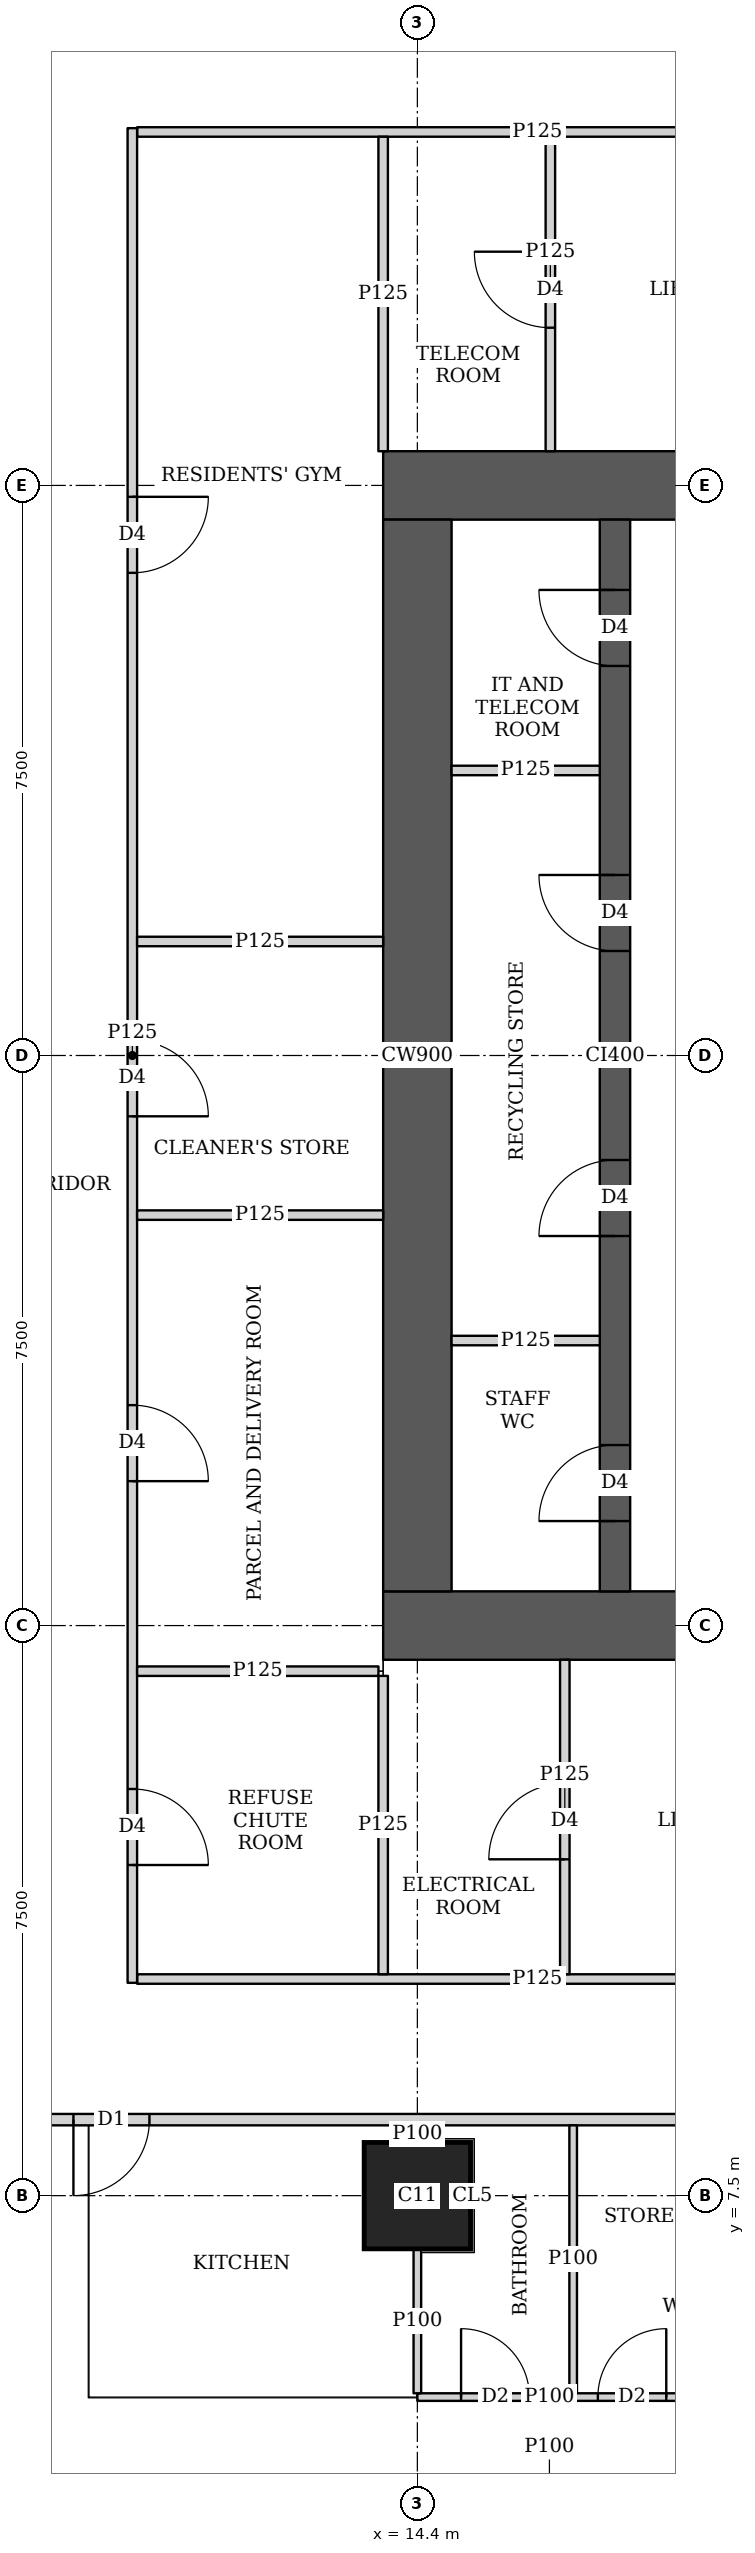
"""IFC4 building model, lengths in metres.
Left out: names, types, materials, properties, quantities, classifications, styles, units other than length and angle.
Written with IfcOpenShell. Run it as: python <this file> out.ifc"""

import sys

from ifc_helpers import new_model, si_unit, direction, frame, frame_2d, origin, origin_2d, place, context, subcontext, project, spatial, rectangle, extrude, element, fill, save


model = new_model("IFC4")
c1 = context("Model", 3, precision=1e-05, world=origin(), true_north=direction((0.0, 1.0)))
c2 = subcontext(c1, "Body", "Model", "MODEL_VIEW")
j1 = project(units=[si_unit("LENGTHUNIT", "METRE"), si_unit("PLANEANGLEUNIT", "RADIAN")], contexts=[c1])
p1 = place(None, origin())
s1 = spatial("IfcSite", under=j1, at=p1, CompositionType="ELEMENT")
p2 = place(p1, origin())
s2 = spatial("IfcBuilding", under=s1, at=p2, CompositionType="ELEMENT")
p3 = place(p2, frame((0.0, 0.0, 212.45)))
s3 = spatial("IfcBuildingStorey", under=s2, at=p3, CompositionType="ELEMENT", Elevation=212.45)
p4 = place(p3, frame((14.4, 7.5, 0.0), z_axis=(0.0, 0.0, 1.0), x_axis=(1.0, 0.0, 0.0)))
e1 = element("IfcColumn", 1, at=p4, inside=s3, PredefinedType="COLUMN", context=c2, shape_type="SweptSolid", body=[
    extrude(rectangle(XDim=1.4, YDim=1.4, at=origin_2d()), origin(), (0.0, 0.0, 1.0), 3.75),
])
p5 = place(p3, frame((13.95, 15.0, 0.0), z_axis=(0.0, 0.0, 1.0), x_axis=(1.0, 0.0, 0.0)))
e2 = element("IfcWall", 2, at=p5, inside=s3, PredefinedType="SHEAR", context=c2, shape_type="SweptSolid", body=[
    extrude(rectangle(XDim=15.3, YDim=0.9, at=frame_2d((7.65, 0.0))), origin(), (0.0, 0.0, 1.0), 3.75),
])
p6 = place(p5, frame((4.45, 0.0, 0.0)))
e3 = element("IfcOpeningElement", 3, at=p6, cuts=e2, PredefinedType="OPENING", context=c2, shape_type="SweptSolid", body=[
    extrude(rectangle(XDim=1.8, YDim=2.1, at=frame_2d((0.9, 1.05))), frame((0.0, 0.46, 0.0), z_axis=(0.0, -1.0, 0.0), x_axis=(1.0, 0.0, 0.0)), (0.0, 0.0, 1.0), 0.92),
])
p7 = place(p5, frame((10.7, 0.0, 0.0)))
e4 = element("IfcOpeningElement", 4, at=p7, cuts=e2, PredefinedType="OPENING", context=c2, shape_type="SweptSolid", body=[
    extrude(rectangle(XDim=1.1, YDim=2.1, at=frame_2d((0.55, 1.05))), frame((0.0, 0.46, 0.0), z_axis=(0.0, -1.0, 0.0), x_axis=(1.0, 0.0, 0.0)), (0.0, 0.0, 1.0), 0.92),
])
p8 = place(p3, frame((13.95, 30.0, 0.0), z_axis=(0.0, 0.0, 1.0), x_axis=(1.0, 0.0, 0.0)))
e5 = element("IfcWall", 5, at=p8, inside=s3, PredefinedType="SHEAR", context=c2, shape_type="SweptSolid", body=[
    extrude(rectangle(XDim=15.3, YDim=0.9, at=frame_2d((7.65, 0.0))), origin(), (0.0, 0.0, 1.0), 3.75),
])
p9 = place(p8, frame((4.45, 0.0, 0.0)))
e6 = element("IfcOpeningElement", 6, at=p9, cuts=e5, PredefinedType="OPENING", context=c2, shape_type="SweptSolid", body=[
    extrude(rectangle(XDim=1.8, YDim=2.1, at=frame_2d((0.9, 1.05))), frame((0.0, 0.46, 0.0), z_axis=(0.0, -1.0, 0.0), x_axis=(1.0, 0.0, 0.0)), (0.0, 0.0, 1.0), 0.92),
])
p10 = place(p8, frame((10.7, 0.0, 0.0)))
e7 = element("IfcOpeningElement", 7, at=p10, cuts=e5, PredefinedType="OPENING", context=c2, shape_type="SweptSolid", body=[
    extrude(rectangle(XDim=1.1, YDim=2.1, at=frame_2d((0.55, 1.05))), frame((0.0, 0.46, 0.0), z_axis=(0.0, -1.0, 0.0), x_axis=(1.0, 0.0, 0.0)), (0.0, 0.0, 1.0), 0.92),
])
p11 = place(p3, frame((14.4, 15.45, 0.0), z_axis=(0.0, 0.0, 1.0), x_axis=(0.0, 1.0, 0.0)))
e8 = element("IfcWall", 8, at=p11, inside=s3, PredefinedType="SHEAR", context=c2, shape_type="SweptSolid", body=[
    extrude(rectangle(XDim=14.1, YDim=0.9, at=frame_2d((7.05, 0.0))), origin(), (0.0, 0.0, 1.0), 3.75),
])
p12 = place(p3, frame((17.0, 15.45, 0.0), z_axis=(0.0, 0.0, 1.0), x_axis=(0.0, 1.0, 0.0)))
e9 = element("IfcWall", 9, at=p12, inside=s3, PredefinedType="SHEAR", context=c2, shape_type="SweptSolid", body=[
    extrude(rectangle(XDim=14.1, YDim=0.4, at=frame_2d((7.05, 0.0))), origin(), (0.0, 0.0, 1.0), 3.75),
])
p13 = place(p12, frame((0.925, 0.0, 0.0)))
e10 = element("IfcOpeningElement", 10, at=p13, cuts=e9, PredefinedType="OPENING", context=c2, shape_type="SweptSolid", body=[
    extrude(rectangle(XDim=1.0, YDim=2.1, at=frame_2d((0.5, 1.05))), frame((0.0, 0.21, 0.0), z_axis=(0.0, -1.0, 0.0), x_axis=(1.0, 0.0, 0.0)), (0.0, 0.0, 1.0), 0.42),
])
p14 = place(p12, frame((4.675, 0.0, 0.0)))
e11 = element("IfcOpeningElement", 11, at=p14, cuts=e9, PredefinedType="OPENING", context=c2, shape_type="SweptSolid", body=[
    extrude(rectangle(XDim=1.0, YDim=2.1, at=frame_2d((0.5, 1.05))), frame((0.0, 0.21, 0.0), z_axis=(0.0, -1.0, 0.0), x_axis=(1.0, 0.0, 0.0)), (0.0, 0.0, 1.0), 0.42),
])
p15 = place(p12, frame((8.425, 0.0, 0.0)))
e12 = element("IfcOpeningElement", 12, at=p15, cuts=e9, PredefinedType="OPENING", context=c2, shape_type="SweptSolid", body=[
    extrude(rectangle(XDim=1.0, YDim=2.1, at=frame_2d((0.5, 1.05))), frame((0.0, 0.21, 0.0), z_axis=(0.0, -1.0, 0.0), x_axis=(1.0, 0.0, 0.0)), (0.0, 0.0, 1.0), 0.42),
])
p16 = place(p12, frame((12.175, 0.0, 0.0)))
e13 = element("IfcOpeningElement", 13, at=p16, cuts=e9, PredefinedType="OPENING", context=c2, shape_type="SweptSolid", body=[
    extrude(rectangle(XDim=1.0, YDim=2.1, at=frame_2d((0.5, 1.05))), frame((0.0, 0.21, 0.0), z_axis=(0.0, -1.0, 0.0), x_axis=(1.0, 0.0, 0.0)), (0.0, 0.0, 1.0), 0.42),
])
p17 = place(p3, frame((40.053, 8.5, 0.0), z_axis=(0.0, 0.0, 1.0), x_axis=(-1.0, 0.0, 0.0)))
e14 = element("IfcWall", 14, at=p17, inside=s3, PredefinedType="SOLIDWALL", context=c2, shape_type="SweptSolid", body=[
    extrude(rectangle(XDim=31.052, YDim=0.15, at=frame_2d((15.526, 0.0))), origin(), (0.0, 0.0, 1.0), 3.5),
])
p18 = place(p17, frame((29.178, 0.0, 0.0)))
e15 = element("IfcOpeningElement", 15, at=p18, cuts=e14, PredefinedType="OPENING", context=c2, shape_type="SweptSolid", body=[
    extrude(rectangle(XDim=1.0, YDim=2.1, at=frame_2d((0.5, 1.05))), frame((0.0, 0.085, 0.0), z_axis=(0.0, -1.0, 0.0), x_axis=(1.0, 0.0, 0.0)), (0.0, 0.0, 1.0), 0.17),
])
p19 = place(p17, frame((19.953, 0.0, 0.0)))
e16 = element("IfcOpeningElement", 16, at=p19, cuts=e14, PredefinedType="OPENING", context=c2, shape_type="SweptSolid", body=[
    extrude(rectangle(XDim=1.0, YDim=2.1, at=frame_2d((0.5, 1.05))), frame((0.0, 0.085, 0.0), z_axis=(0.0, -1.0, 0.0), x_axis=(1.0, 0.0, 0.0)), (0.0, 0.0, 1.0), 0.17),
])
p20 = place(p17, frame((12.753, 0.0, 0.0)))
e17 = element("IfcOpeningElement", 17, at=p20, cuts=e14, PredefinedType="OPENING", context=c2, shape_type="SweptSolid", body=[
    extrude(rectangle(XDim=1.0, YDim=2.1, at=frame_2d((0.5, 1.05))), frame((0.0, 0.085, 0.0), z_axis=(0.0, -1.0, 0.0), x_axis=(1.0, 0.0, 0.0)), (0.0, 0.0, 1.0), 0.17),
])
p21 = place(p17, frame((0.15, 0.0, 0.0)))
e18 = element("IfcOpeningElement", 18, at=p21, cuts=e14, PredefinedType="OPENING", context=c2, shape_type="SweptSolid", body=[
    extrude(rectangle(XDim=1.0, YDim=2.1, at=frame_2d((0.5, 1.05))), frame((0.0, 0.085, 0.0), z_axis=(0.0, -1.0, 0.0), x_axis=(1.0, 0.0, 0.0)), (0.0, 0.0, 1.0), 0.17),
])
p22 = place(p3, frame((17.875, 4.85, 0.0), z_axis=(0.0, 0.0, 1.0), x_axis=(-1.0, 0.0, 0.0)))
e19 = element("IfcWall", 19, at=p22, inside=s3, PredefinedType="PARTITIONING", context=c2, shape_type="SweptSolid", body=[
    extrude(rectangle(XDim=3.475, YDim=0.1, at=frame_2d((1.738, 0.0))), origin(), (0.0, 0.0, 1.0), 3.5),
])
p23 = place(p22, frame((2.0, 0.0, 0.0)))
e20 = element("IfcOpeningElement", 20, at=p23, cuts=e19, PredefinedType="OPENING", context=c2, shape_type="SweptSolid", body=[
    extrude(rectangle(XDim=0.9, YDim=2.1, at=frame_2d((0.45, 1.05))), frame((0.0, 0.06, 0.0), z_axis=(0.0, -1.0, 0.0), x_axis=(1.0, 0.0, 0.0)), (0.0, 0.0, 1.0), 0.12),
])
p24 = place(p22, frame((0.2, 0.0, 0.0)))
e21 = element("IfcOpeningElement", 21, at=p24, cuts=e19, PredefinedType="OPENING", context=c2, shape_type="SweptSolid", body=[
    extrude(rectangle(XDim=0.9, YDim=2.1, at=frame_2d((0.45, 1.05))), frame((0.0, 0.06, 0.0), z_axis=(0.0, -1.0, 0.0), x_axis=(1.0, 0.0, 0.0)), (0.0, 0.0, 1.0), 0.12),
])
p25 = place(p3, frame((14.4, 4.9, 0.0), z_axis=(0.0, 0.0, 1.0), x_axis=(0.0, 1.0, 0.0)))
e22 = element("IfcWall", 22, at=p25, inside=s3, PredefinedType="PARTITIONING", context=c2, shape_type="SweptSolid", body=[
    extrude(rectangle(XDim=1.899, YDim=0.1, at=frame_2d((0.95, 0.0))), origin(), (0.0, 0.0, 1.0), 3.5),
])
p26 = place(p3, frame((14.4, 8.201, 0.0), z_axis=(0.0, 0.0, 1.0), x_axis=(0.0, 1.0, 0.0)))
e23 = element("IfcWall", 23, at=p26, inside=s3, PredefinedType="PARTITIONING", context=c2, shape_type="SweptSolid", body=[
    extrude(rectangle(XDim=0.224, YDim=0.1, at=frame_2d((0.112, 0.0))), origin(), (0.0, 0.0, 1.0), 3.5),
])
p27 = place(p3, frame((16.45, 4.9, 0.0), z_axis=(0.0, 0.0, 1.0), x_axis=(0.0, 1.0, 0.0)))
e24 = element("IfcWall", 24, at=p27, inside=s3, PredefinedType="PARTITIONING", context=c2, shape_type="SweptSolid", body=[
    extrude(rectangle(XDim=3.525, YDim=0.1, at=frame_2d((1.763, 0.0))), origin(), (0.0, 0.0, 1.0), 3.5),
])
p28 = place(p3, frame((10.65, 10.3, 0.0), z_axis=(0.0, 0.0, 1.0), x_axis=(0.0, 1.0, 0.0)))
e25 = element("IfcWall", 25, at=p28, inside=s3, PredefinedType="PARTITIONING", context=c2, shape_type="SweptSolid", body=[
    extrude(rectangle(XDim=24.4, YDim=0.125, at=frame_2d((12.2, 0.0))), origin(), (0.0, 0.0, 1.0), 3.5),
])
p29 = place(p28, frame((1.55, 0.0, 0.0)))
e26 = element("IfcOpeningElement", 26, at=p29, cuts=e25, PredefinedType="OPENING", context=c2, shape_type="SweptSolid", body=[
    extrude(rectangle(XDim=1.0, YDim=2.1, at=frame_2d((0.5, 1.05))), frame((0.0, 0.073, 0.0), z_axis=(0.0, -1.0, 0.0), x_axis=(1.0, 0.0, 0.0)), (0.0, 0.0, 1.0), 0.145),
])
p30 = place(p28, frame((6.6, 0.0, 0.0)))
e27 = element("IfcOpeningElement", 27, at=p30, cuts=e25, PredefinedType="OPENING", context=c2, shape_type="SweptSolid", body=[
    extrude(rectangle(XDim=1.0, YDim=2.1, at=frame_2d((0.5, 1.05))), frame((0.0, 0.073, 0.0), z_axis=(0.0, -1.0, 0.0), x_axis=(1.0, 0.0, 0.0)), (0.0, 0.0, 1.0), 0.145),
])
p31 = place(p28, frame((11.4, 0.0, 0.0)))
e28 = element("IfcOpeningElement", 28, at=p31, cuts=e25, PredefinedType="OPENING", context=c2, shape_type="SweptSolid", body=[
    extrude(rectangle(XDim=1.0, YDim=2.1, at=frame_2d((0.5, 1.05))), frame((0.0, 0.073, 0.0), z_axis=(0.0, -1.0, 0.0), x_axis=(1.0, 0.0, 0.0)), (0.0, 0.0, 1.0), 0.145),
])
p32 = place(p28, frame((18.55, 0.0, 0.0)))
e29 = element("IfcOpeningElement", 29, at=p32, cuts=e25, PredefinedType="OPENING", context=c2, shape_type="SweptSolid", body=[
    extrude(rectangle(XDim=1.0, YDim=2.1, at=frame_2d((0.5, 1.05))), frame((0.0, 0.073, 0.0), z_axis=(0.0, -1.0, 0.0), x_axis=(1.0, 0.0, 0.0)), (0.0, 0.0, 1.0), 0.145),
])
p33 = place(p3, frame((10.713, 14.4, 0.0), z_axis=(0.0, 0.0, 1.0), x_axis=(1.0, 0.0, 0.0)))
e30 = element("IfcWall", 30, at=p33, inside=s3, PredefinedType="PARTITIONING", context=c2, shape_type="SweptSolid", body=[
    extrude(rectangle(XDim=3.175, YDim=0.125, at=frame_2d((1.587, 0.0))), origin(), (0.0, 0.0, 1.0), 3.5),
])
for number, where, z_axis, x_axis in (
    (31, (10.713, 20.4, 0.0), (0.0, 0.0, 1.0), (1.0, 0.0, 0.0)),
    (32, (10.713, 24.0, 0.0), (0.0, 0.0, 1.0), (1.0, 0.0, 0.0)),
):
    element("IfcWall", number, at=place(p3, frame(where, z_axis=z_axis, x_axis=x_axis)), inside=s3, PredefinedType="PARTITIONING", context=c2, shape_type="SweptSolid", body=[
        extrude(rectangle(XDim=3.237, YDim=0.125, at=frame_2d((1.619, 0.0))), origin(), (0.0, 0.0, 1.0), 3.5),
    ])
p34 = place(p3, frame((13.95, 10.413, 0.0), z_axis=(0.0, 0.0, 1.0), x_axis=(0.0, 1.0, 0.0)))
e33 = element("IfcWall", 33, at=p34, inside=s3, PredefinedType="PARTITIONING", context=c2, shape_type="SweptSolid", body=[
    extrude(rectangle(XDim=3.925, YDim=0.125, at=frame_2d((1.962, 0.0))), origin(), (0.0, 0.0, 1.0), 3.5),
])
p35 = place(p3, frame((13.95, 30.45, 0.0), z_axis=(0.0, 0.0, 1.0), x_axis=(0.0, 1.0, 0.0)))
e34 = element("IfcWall", 34, at=p35, inside=s3, PredefinedType="PARTITIONING", context=c2, shape_type="SweptSolid", body=[
    extrude(rectangle(XDim=4.137, YDim=0.125, at=frame_2d((2.068, 0.0))), origin(), (0.0, 0.0, 1.0), 3.5),
])
p36 = place(p3, frame((10.713, 10.35, 0.0), z_axis=(0.0, 0.0, 1.0), x_axis=(1.0, 0.0, 0.0)))
e35 = element("IfcWall", 35, at=p36, inside=s3, PredefinedType="PARTITIONING", context=c2, shape_type="SweptSolid", body=[
    extrude(rectangle(XDim=10.537, YDim=0.125, at=frame_2d((5.269, 0.0))), origin(), (0.0, 0.0, 1.0), 3.5),
])
p37 = place(p36, frame((7.282, 0.0, 0.0)))
e36 = element("IfcOpeningElement", 36, at=p37, cuts=e35, PredefinedType="OPENING", context=c2, shape_type="SweptSolid", body=[
    extrude(rectangle(XDim=1.8, YDim=2.1, at=frame_2d((0.9, 1.05))), frame((0.0, 0.073, 0.0), z_axis=(0.0, -1.0, 0.0), x_axis=(1.0, 0.0, 0.0)), (0.0, 0.0, 1.0), 0.145),
])
p38 = place(p3, frame((10.713, 34.65, 0.0), z_axis=(0.0, 0.0, 1.0), x_axis=(1.0, 0.0, 0.0)))
e37 = element("IfcWall", 37, at=p38, inside=s3, PredefinedType="PARTITIONING", context=c2, shape_type="SweptSolid", body=[
    extrude(rectangle(XDim=10.537, YDim=0.125, at=frame_2d((5.269, 0.0))), origin(), (0.0, 0.0, 1.0), 3.5),
])
p39 = place(p38, frame((7.187, 0.0, 0.0)))
e38 = element("IfcOpeningElement", 38, at=p39, cuts=e37, PredefinedType="OPENING", context=c2, shape_type="SweptSolid", body=[
    extrude(rectangle(XDim=1.8, YDim=2.1, at=frame_2d((0.9, 1.05))), frame((0.0, 0.073, 0.0), z_axis=(0.0, -1.0, 0.0), x_axis=(1.0, 0.0, 0.0)), (0.0, 0.0, 1.0), 0.145),
])
p40 = place(p3, frame((16.34, 10.413, 0.0), z_axis=(0.0, 0.0, 1.0), x_axis=(0.0, 1.0, 0.0)))
e39 = element("IfcWall", 39, at=p40, inside=s3, PredefinedType="PARTITIONING", context=c2, shape_type="SweptSolid", body=[
    extrude(rectangle(XDim=4.137, YDim=0.125, at=frame_2d((2.068, 0.0))), origin(), (0.0, 0.0, 1.0), 3.5),
])
p41 = place(p40, frame((1.512, 0.0, 0.0)))
e40 = element("IfcOpeningElement", 40, at=p41, cuts=e39, PredefinedType="OPENING", context=c2, shape_type="SweptSolid", body=[
    extrude(rectangle(XDim=1.0, YDim=2.1, at=frame_2d((0.5, 1.05))), frame((0.0, 0.073, 0.0), z_axis=(0.0, -1.0, 0.0), x_axis=(1.0, 0.0, 0.0)), (0.0, 0.0, 1.0), 0.145),
])
p42 = place(p3, frame((16.15, 30.45, 0.0), z_axis=(0.0, 0.0, 1.0), x_axis=(0.0, 1.0, 0.0)))
e41 = element("IfcWall", 41, at=p42, inside=s3, PredefinedType="PARTITIONING", context=c2, shape_type="SweptSolid", body=[
    extrude(rectangle(XDim=4.137, YDim=0.125, at=frame_2d((2.068, 0.0))), origin(), (0.0, 0.0, 1.0), 3.5),
])
p43 = place(p42, frame((1.625, 0.0, 0.0)))
e42 = element("IfcOpeningElement", 42, at=p43, cuts=e41, PredefinedType="OPENING", context=c2, shape_type="SweptSolid", body=[
    extrude(rectangle(XDim=1.0, YDim=2.1, at=frame_2d((0.5, 1.05))), frame((0.0, 0.073, 0.0), z_axis=(0.0, -1.0, 0.0), x_axis=(1.0, 0.0, 0.0)), (0.0, 0.0, 1.0), 0.145),
])
for number, where, z_axis, x_axis in (
    (43, (14.85, 18.75, 0.0), (0.0, 0.0, 1.0), (1.0, 0.0, 0.0)),
    (44, (14.85, 26.25, 0.0), (0.0, 0.0, 1.0), (1.0, 0.0, 0.0)),
):
    element("IfcWall", number, at=place(p3, frame(where, z_axis=z_axis, x_axis=x_axis)), inside=s3, PredefinedType="PARTITIONING", context=c2, shape_type="SweptSolid", body=[
        extrude(rectangle(XDim=1.95, YDim=0.125, at=frame_2d((0.975, 0.0))), origin(), (0.0, 0.0, 1.0), 3.5),
    ])
p44 = place(p23, origin())
e45 = element("IfcDoor", 45, at=p44, inside=s3, OperationType="SINGLE_SWING_LEFT", PredefinedType="DOOR", context=c2, shape_type="SweptSolid", body=[
    extrude(rectangle(XDim=0.9, YDim=2.1, at=frame_2d((0.45, 1.05))), frame((0.0, 0.025, 0.0), z_axis=(0.0, -1.0, 0.0), x_axis=(1.0, 0.0, 0.0)), (0.0, 0.0, 1.0), 0.05),
])
fill(e20, e45)
p45 = place(p24, origin())
e46 = element("IfcDoor", 46, at=p45, inside=s3, OperationType="SINGLE_SWING_RIGHT", PredefinedType="DOOR", context=c2, shape_type="SweptSolid", body=[
    extrude(rectangle(XDim=0.9, YDim=2.1, at=frame_2d((0.45, 1.05))), frame((0.0, 0.025, 0.0), z_axis=(0.0, -1.0, 0.0), x_axis=(1.0, 0.0, 0.0)), (0.0, 0.0, 1.0), 0.05),
])
fill(e21, e46)
p46 = place(p18, origin())
e47 = element("IfcDoor", 47, at=p46, inside=s3, OperationType="SINGLE_SWING_RIGHT", PredefinedType="DOOR", context=c2, shape_type="SweptSolid", body=[
    extrude(rectangle(XDim=1.0, YDim=2.1, at=frame_2d((0.5, 1.05))), frame((0.0, 0.025, 0.0), z_axis=(0.0, -1.0, 0.0), x_axis=(1.0, 0.0, 0.0)), (0.0, 0.0, 1.0), 0.05),
])
fill(e15, e47)
p47 = place(p29, origin())
e48 = element("IfcDoor", 48, at=p47, inside=s3, OperationType="SINGLE_SWING_RIGHT", PredefinedType="DOOR", context=c2, shape_type="SweptSolid", body=[
    extrude(rectangle(XDim=1.0, YDim=2.1, at=frame_2d((0.5, 1.05))), frame((0.0, 0.025, 0.0), z_axis=(0.0, -1.0, 0.0), x_axis=(1.0, 0.0, 0.0)), (0.0, 0.0, 1.0), 0.05),
])
fill(e26, e48)
p48 = place(p30, origin())
e49 = element("IfcDoor", 49, at=p48, inside=s3, OperationType="SINGLE_SWING_RIGHT", PredefinedType="DOOR", context=c2, shape_type="SweptSolid", body=[
    extrude(rectangle(XDim=1.0, YDim=2.1, at=frame_2d((0.5, 1.05))), frame((0.0, 0.025, 0.0), z_axis=(0.0, -1.0, 0.0), x_axis=(1.0, 0.0, 0.0)), (0.0, 0.0, 1.0), 0.05),
])
fill(e27, e49)
p49 = place(p31, origin())
e50 = element("IfcDoor", 50, at=p49, inside=s3, OperationType="SINGLE_SWING_RIGHT", PredefinedType="DOOR", context=c2, shape_type="SweptSolid", body=[
    extrude(rectangle(XDim=1.0, YDim=2.1, at=frame_2d((0.5, 1.05))), frame((0.0, 0.025, 0.0), z_axis=(0.0, -1.0, 0.0), x_axis=(1.0, 0.0, 0.0)), (0.0, 0.0, 1.0), 0.05),
])
fill(e28, e50)
p50 = place(p32, origin())
e51 = element("IfcDoor", 51, at=p50, inside=s3, OperationType="SINGLE_SWING_LEFT", PredefinedType="DOOR", context=c2, shape_type="SweptSolid", body=[
    extrude(rectangle(XDim=1.0, YDim=2.1, at=frame_2d((0.5, 1.05))), frame((0.0, 0.025, 0.0), z_axis=(0.0, -1.0, 0.0), x_axis=(1.0, 0.0, 0.0)), (0.0, 0.0, 1.0), 0.05),
])
fill(e29, e51)
p51 = place(p41, origin())
e52 = element("IfcDoor", 52, at=p51, inside=s3, OperationType="SINGLE_SWING_LEFT", PredefinedType="DOOR", context=c2, shape_type="SweptSolid", body=[
    extrude(rectangle(XDim=1.0, YDim=2.1, at=frame_2d((0.5, 1.05))), frame((0.0, 0.025, 0.0), z_axis=(0.0, -1.0, 0.0), x_axis=(1.0, 0.0, 0.0)), (0.0, 0.0, 1.0), 0.05),
])
fill(e40, e52)
p52 = place(p43, origin())
e53 = element("IfcDoor", 53, at=p52, inside=s3, OperationType="SINGLE_SWING_RIGHT", PredefinedType="DOOR", context=c2, shape_type="SweptSolid", body=[
    extrude(rectangle(XDim=1.0, YDim=2.1, at=frame_2d((0.5, 1.05))), frame((0.0, 0.025, 0.0), z_axis=(0.0, -1.0, 0.0), x_axis=(1.0, 0.0, 0.0)), (0.0, 0.0, 1.0), 0.05),
])
fill(e42, e53)
p53 = place(p13, origin())
e54 = element("IfcDoor", 54, at=p53, inside=s3, OperationType="SINGLE_SWING_LEFT", PredefinedType="DOOR", context=c2, shape_type="SweptSolid", body=[
    extrude(rectangle(XDim=1.0, YDim=2.1, at=frame_2d((0.5, 1.05))), frame((0.0, 0.025, 0.0), z_axis=(0.0, -1.0, 0.0), x_axis=(1.0, 0.0, 0.0)), (0.0, 0.0, 1.0), 0.05),
])
fill(e10, e54)
p54 = place(p14, origin())
e55 = element("IfcDoor", 55, at=p54, inside=s3, OperationType="SINGLE_SWING_LEFT", PredefinedType="DOOR", context=c2, shape_type="SweptSolid", body=[
    extrude(rectangle(XDim=1.0, YDim=2.1, at=frame_2d((0.5, 1.05))), frame((0.0, 0.025, 0.0), z_axis=(0.0, -1.0, 0.0), x_axis=(1.0, 0.0, 0.0)), (0.0, 0.0, 1.0), 0.05),
])
fill(e11, e55)
p55 = place(p15, origin())
e56 = element("IfcDoor", 56, at=p55, inside=s3, OperationType="SINGLE_SWING_RIGHT", PredefinedType="DOOR", context=c2, shape_type="SweptSolid", body=[
    extrude(rectangle(XDim=1.0, YDim=2.1, at=frame_2d((0.5, 1.05))), frame((0.0, 0.025, 0.0), z_axis=(0.0, -1.0, 0.0), x_axis=(1.0, 0.0, 0.0)), (0.0, 0.0, 1.0), 0.05),
])
fill(e12, e56)
p56 = place(p16, origin())
e57 = element("IfcDoor", 57, at=p56, inside=s3, OperationType="SINGLE_SWING_RIGHT", PredefinedType="DOOR", context=c2, shape_type="SweptSolid", body=[
    extrude(rectangle(XDim=1.0, YDim=2.1, at=frame_2d((0.5, 1.05))), frame((0.0, 0.025, 0.0), z_axis=(0.0, -1.0, 0.0), x_axis=(1.0, 0.0, 0.0)), (0.0, 0.0, 1.0), 0.05),
])
fill(e13, e57)
save(model, sys.argv[1])
